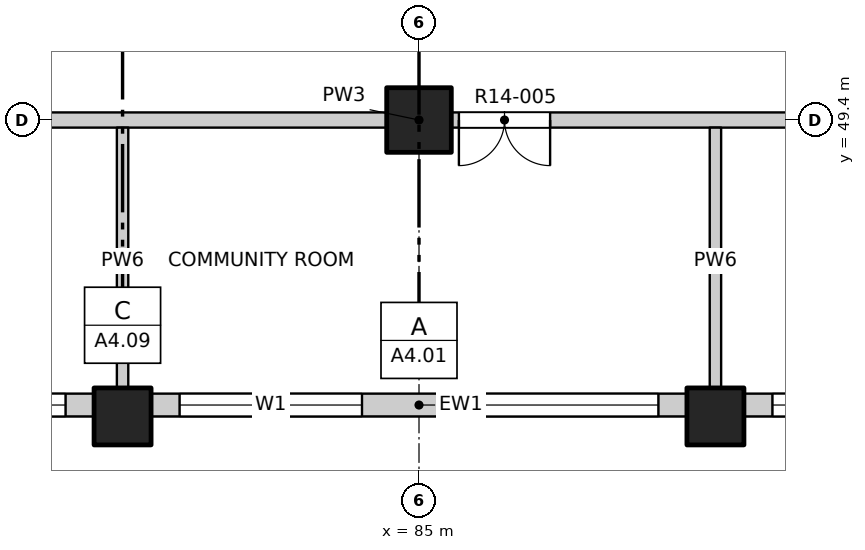
"""IFC4 building model, lengths in metres.
Left out: names, types, materials, properties, quantities, classifications, styles, units other than length and angle.
Written with IfcOpenShell. Run it as: python <this file> out.ifc"""

import sys

from ifc_helpers import new_model, si_unit, direction, frame, frame_2d, origin, origin_2d, place, context, subcontext, project, spatial, rectangle, extrude, element, fill, save


model = new_model("IFC4")
c1 = context("Model", 3, precision=1e-05, world=origin(), true_north=direction((0.0, 1.0)))
c2 = subcontext(c1, "Body", "Model", "MODEL_VIEW")
j1 = project(units=[si_unit("LENGTHUNIT", "METRE"), si_unit("PLANEANGLEUNIT", "RADIAN")], contexts=[c1])
p1 = place(None, origin())
s1 = spatial("IfcSite", under=j1, at=p1, CompositionType="ELEMENT")
p2 = place(p1, origin())
s2 = spatial("IfcBuilding", under=s1, at=p2, CompositionType="ELEMENT")
p3 = place(p2, frame((0.0, 0.0, 148.6)))
s3 = spatial("IfcBuildingStorey", under=s2, at=p3, CompositionType="ELEMENT", Elevation=148.6)
for number, where, z_axis, x_axis in (
    (1, (81.1, 45.5, -0.3), (0.0, 0.0, 1.0), (1.0, 0.0, 0.0)),
    (2, (88.9, 45.5, -0.3), (0.0, 0.0, 1.0), (1.0, 0.0, 0.0)),
):
    element("IfcColumn", number, at=place(p3, frame(where, z_axis=z_axis, x_axis=x_axis)), inside=s3, PredefinedType="COLUMN", context=c2, shape_type="SweptSolid", body=[
        extrude(rectangle(XDim=0.75, YDim=0.75, at=origin_2d()), origin(), (0.0, 0.0, 1.0), 3.45),
    ])
p4 = place(p3, frame((85.0, 49.4, -0.3), z_axis=(0.0, 0.0, 1.0), x_axis=(1.0, 0.0, 0.0)))
e3 = element("IfcColumn", 3, at=p4, inside=s3, PredefinedType="COLUMN", context=c2, shape_type="SweptSolid", body=[
    extrude(rectangle(XDim=0.85, YDim=0.85, at=origin_2d()), origin(), (0.0, 0.0, 1.0), 3.45),
])
p5 = place(p3, frame((73.675, 45.65, 0.0), z_axis=(0.0, 0.0, 1.0), x_axis=(1.0, 0.0, 0.0)))
e4 = element("IfcWall", 4, at=p5, inside=s3, PredefinedType="SOLIDWALL", context=c2, shape_type="SweptSolid", body=[
    extrude(rectangle(XDim=7.05, YDim=0.3, at=frame_2d((3.525, 0.0))), origin(), (0.0, 0.0, 1.0), 2.7),
])
p6 = place(p5, frame((0.375, 0.0, 0.9)))
e5 = element("IfcOpeningElement", 5, at=p6, cuts=e4, PredefinedType="OPENING", context=c2, shape_type="SweptSolid", body=[
    extrude(rectangle(XDim=2.4, YDim=1.8, at=frame_2d((1.2, 0.9))), frame((0.0, 0.16, 0.0), z_axis=(0.0, -1.0, 0.0), x_axis=(1.0, 0.0, 0.0)), (0.0, 0.0, 1.0), 0.32),
])
p7 = place(p5, frame((4.275, 0.0, 0.9)))
e6 = element("IfcOpeningElement", 6, at=p7, cuts=e4, PredefinedType="OPENING", context=c2, shape_type="SweptSolid", body=[
    extrude(rectangle(XDim=2.4, YDim=1.8, at=frame_2d((1.2, 0.9))), frame((0.0, 0.16, 0.0), z_axis=(0.0, -1.0, 0.0), x_axis=(1.0, 0.0, 0.0)), (0.0, 0.0, 1.0), 0.32),
])
p8 = place(p3, frame((81.475, 45.65, 0.0), z_axis=(0.0, 0.0, 1.0), x_axis=(1.0, 0.0, 0.0)))
e7 = element("IfcWall", 7, at=p8, inside=s3, PredefinedType="SOLIDWALL", context=c2, shape_type="SweptSolid", body=[
    extrude(rectangle(XDim=7.05, YDim=0.3, at=frame_2d((3.525, 0.0))), origin(), (0.0, 0.0, 1.0), 2.7),
])
p9 = place(p8, frame((0.375, 0.0, 0.9)))
e8 = element("IfcOpeningElement", 8, at=p9, cuts=e7, PredefinedType="OPENING", context=c2, shape_type="SweptSolid", body=[
    extrude(rectangle(XDim=2.4, YDim=1.8, at=frame_2d((1.2, 0.9))), frame((0.0, 0.16, 0.0), z_axis=(0.0, -1.0, 0.0), x_axis=(1.0, 0.0, 0.0)), (0.0, 0.0, 1.0), 0.32),
])
p10 = place(p8, frame((4.275, 0.0, 0.9)))
e9 = element("IfcOpeningElement", 9, at=p10, cuts=e7, PredefinedType="OPENING", context=c2, shape_type="SweptSolid", body=[
    extrude(rectangle(XDim=2.4, YDim=1.8, at=frame_2d((1.2, 0.9))), frame((0.0, 0.16, 0.0), z_axis=(0.0, -1.0, 0.0), x_axis=(1.0, 0.0, 0.0)), (0.0, 0.0, 1.0), 0.32),
])
p11 = place(p3, frame((89.275, 45.65, 0.0), z_axis=(0.0, 0.0, 1.0), x_axis=(1.0, 0.0, 0.0)))
e10 = element("IfcWall", 10, at=p11, inside=s3, PredefinedType="SOLIDWALL", context=c2, shape_type="SweptSolid", body=[
    extrude(rectangle(XDim=7.05, YDim=0.3, at=frame_2d((3.525, 0.0))), origin(), (0.0, 0.0, 1.0), 2.7),
])
p12 = place(p11, frame((0.375, 0.0, 0.9)))
e11 = element("IfcOpeningElement", 11, at=p12, cuts=e10, PredefinedType="OPENING", context=c2, shape_type="SweptSolid", body=[
    extrude(rectangle(XDim=2.4, YDim=1.8, at=frame_2d((1.2, 0.9))), frame((0.0, 0.16, 0.0), z_axis=(0.0, -1.0, 0.0), x_axis=(1.0, 0.0, 0.0)), (0.0, 0.0, 1.0), 0.32),
])
p13 = place(p11, frame((4.275, 0.0, 0.9)))
e12 = element("IfcOpeningElement", 12, at=p13, cuts=e10, PredefinedType="OPENING", context=c2, shape_type="SweptSolid", body=[
    extrude(rectangle(XDim=2.4, YDim=1.8, at=frame_2d((1.2, 0.9))), frame((0.0, 0.16, 0.0), z_axis=(0.0, -1.0, 0.0), x_axis=(1.0, 0.0, 0.0)), (0.0, 0.0, 1.0), 0.32),
])
p14 = place(p3, frame((73.2, 49.4, 0.0), z_axis=(0.0, 0.0, 1.0), x_axis=(1.0, 0.0, 0.0)))
e13 = element("IfcWall", 13, at=p14, inside=s3, PredefinedType="PARTITIONING", context=c2, shape_type="SweptSolid", body=[
    extrude(rectangle(XDim=23.6, YDim=0.2, at=frame_2d((11.8, 0.0))), origin(), (0.0, 0.0, 1.0), 3.15),
])
p15 = place(p14, frame((4.525, 0.0, 0.0)))
e14 = element("IfcOpeningElement", 14, at=p15, cuts=e13, PredefinedType="OPENING", context=c2, shape_type="SweptSolid", body=[
    extrude(rectangle(XDim=1.2, YDim=2.1, at=frame_2d((0.6, 1.05))), frame((0.0, 0.11, 0.0), z_axis=(0.0, -1.0, 0.0), x_axis=(1.0, 0.0, 0.0)), (0.0, 0.0, 1.0), 0.22),
])
p16 = place(p14, frame((12.325, 0.0, 0.0)))
e15 = element("IfcOpeningElement", 15, at=p16, cuts=e13, PredefinedType="OPENING", context=c2, shape_type="SweptSolid", body=[
    extrude(rectangle(XDim=1.2, YDim=2.1, at=frame_2d((0.6, 1.05))), frame((0.0, 0.11, 0.0), z_axis=(0.0, -1.0, 0.0), x_axis=(1.0, 0.0, 0.0)), (0.0, 0.0, 1.0), 0.22),
])
p17 = place(p14, frame((20.125, 0.0, 0.0)))
e16 = element("IfcOpeningElement", 16, at=p17, cuts=e13, PredefinedType="OPENING", context=c2, shape_type="SweptSolid", body=[
    extrude(rectangle(XDim=1.2, YDim=2.1, at=frame_2d((0.6, 1.05))), frame((0.0, 0.11, 0.0), z_axis=(0.0, -1.0, 0.0), x_axis=(1.0, 0.0, 0.0)), (0.0, 0.0, 1.0), 0.22),
])
for number, where, z_axis, x_axis in (
    (17, (81.1, 45.8, 0.0), (0.0, 0.0, 1.0), (0.0, 1.0, 0.0)),
    (18, (88.9, 45.8, 0.0), (0.0, 0.0, 1.0), (0.0, 1.0, 0.0)),
):
    element("IfcWall", number, at=place(p3, frame(where, z_axis=z_axis, x_axis=x_axis)), inside=s3, PredefinedType="PARTITIONING", context=c2, shape_type="SweptSolid", body=[
        extrude(rectangle(XDim=3.5, YDim=0.15, at=frame_2d((1.75, 0.0))), origin(), (0.0, 0.0, 1.0), 3.15),
    ])
p18 = place(p7, origin())
e19 = element("IfcWindow", 19, at=p18, inside=s3, PartitioningType="DOUBLE_PANEL_VERTICAL", PredefinedType="WINDOW", context=c2, shape_type="SweptSolid", body=[
    extrude(rectangle(XDim=2.4, YDim=1.8, at=frame_2d((1.2, 0.9))), frame((0.0, 0.03, 0.0), z_axis=(0.0, -1.0, 0.0), x_axis=(1.0, 0.0, 0.0)), (0.0, 0.0, 1.0), 0.06),
])
fill(e6, e19)
p19 = place(p9, origin())
e20 = element("IfcWindow", 20, at=p19, inside=s3, PartitioningType="DOUBLE_PANEL_VERTICAL", PredefinedType="WINDOW", context=c2, shape_type="SweptSolid", body=[
    extrude(rectangle(XDim=2.4, YDim=1.8, at=frame_2d((1.2, 0.9))), frame((0.0, 0.03, 0.0), z_axis=(0.0, -1.0, 0.0), x_axis=(1.0, 0.0, 0.0)), (0.0, 0.0, 1.0), 0.06),
])
fill(e8, e20)
p20 = place(p10, origin())
e21 = element("IfcWindow", 21, at=p20, inside=s3, PartitioningType="DOUBLE_PANEL_VERTICAL", PredefinedType="WINDOW", context=c2, shape_type="SweptSolid", body=[
    extrude(rectangle(XDim=2.4, YDim=1.8, at=frame_2d((1.2, 0.9))), frame((0.0, 0.03, 0.0), z_axis=(0.0, -1.0, 0.0), x_axis=(1.0, 0.0, 0.0)), (0.0, 0.0, 1.0), 0.06),
])
fill(e9, e21)
p21 = place(p12, origin())
e22 = element("IfcWindow", 22, at=p21, inside=s3, PartitioningType="DOUBLE_PANEL_VERTICAL", PredefinedType="WINDOW", context=c2, shape_type="SweptSolid", body=[
    extrude(rectangle(XDim=2.4, YDim=1.8, at=frame_2d((1.2, 0.9))), frame((0.0, 0.03, 0.0), z_axis=(0.0, -1.0, 0.0), x_axis=(1.0, 0.0, 0.0)), (0.0, 0.0, 1.0), 0.06),
])
fill(e11, e22)
p22 = place(p16, origin())
e23 = element("IfcDoor", 23, at=p22, inside=s3, OperationType="DOUBLE_DOOR_SINGLE_SWING", PredefinedType="DOOR", context=c2, shape_type="SweptSolid", body=[
    extrude(rectangle(XDim=1.2, YDim=2.1, at=frame_2d((0.6, 1.05))), frame((0.0, 0.025, 0.0), z_axis=(0.0, -1.0, 0.0), x_axis=(1.0, 0.0, 0.0)), (0.0, 0.0, 1.0), 0.05),
])
fill(e15, e23)
save(model, sys.argv[1])
